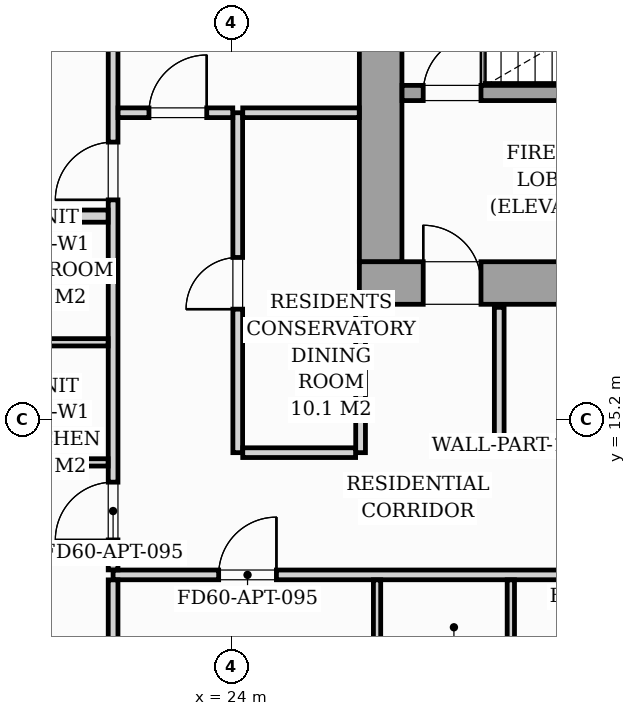
"""IFC4 building model, lengths in metres.
Left out: names, types, materials, properties, quantities, classifications, styles, units other than length and angle.
Written with IfcOpenShell. Run it as: python <this file> out.ifc"""

import sys

from ifc_helpers import new_model, si_unit, direction, frame, frame_2d, origin, origin_2d, place, context, subcontext, project, spatial, rectangle, i_section, extrude, source, transform, mapped, element, fill, save


model = new_model("IFC4")
c1 = context("Model", 3, precision=1e-05, world=origin(), true_north=direction((0.0, 1.0)))
c2 = subcontext(c1, "Body", "Model", "MODEL_VIEW")
j1 = project(units=[si_unit("LENGTHUNIT", "METRE"), si_unit("PLANEANGLEUNIT", "RADIAN")], contexts=[c1])
p1 = place(None, origin())
s1 = spatial("IfcSite", under=j1, at=p1, CompositionType="ELEMENT")
p2 = place(p1, origin())
s2 = spatial("IfcBuilding", under=s1, at=p2, CompositionType="ELEMENT")
p3 = place(p2, frame((0.0, 0.0, 159.8)))
s3 = spatial("IfcBuildingStorey", under=s2, at=p3, CompositionType="ELEMENT", Elevation=159.8)
m1 = source(origin(), c2, "Body", "SweptSolid", [
    extrude(i_section(OverallWidth=0.421, OverallDepth=0.465, WebThickness=0.045, FlangeThickness=0.073, FilletRadius=0.018, at=origin_2d()), origin(), (0.0, 0.0, 1.0), 3.196),
])
p4 = place(p3, frame((26.4, 17.4, 0.002), z_axis=(0.0, 0.0, 1.0), x_axis=(1.0, 0.0, 0.0)))
e1 = element("IfcColumn", 1, at=p4, inside=s3, PredefinedType="PILASTER", context=c2, shape_type="MappedRepresentation", body=[
    mapped(m1, transform((0.0, 0.0, 0.0), scale=1.0)),
])
p5 = place(p3, frame((26.1, 17.45, 0.0), z_axis=(0.0, 0.0, 1.0), x_axis=(1.0, 0.0, 0.0)))
e2 = element("IfcWall", 2, at=p5, inside=s3, PredefinedType="SHEAR", context=c2, shape_type="SweptSolid", body=[
    extrude(rectangle(XDim=19.8, YDim=0.7, at=frame_2d((9.9, 0.0))), origin(), (0.0, 0.0, 1.0), 3.2),
])
p6 = place(p5, frame((1.05, 0.0, 0.0)))
e3 = element("IfcOpeningElement", 3, at=p6, cuts=e2, PredefinedType="OPENING", context=c2, shape_type="SweptSolid", body=[
    extrude(rectangle(XDim=0.95, YDim=2.06, at=frame_2d((0.475, 1.03))), frame((0.0, 0.36, 0.0), z_axis=(0.0, -1.0, 0.0), x_axis=(1.0, 0.0, 0.0)), (0.0, 0.0, 1.0), 0.72),
])
p7 = place(p5, frame((9.48, 0.0, 0.0)))
e4 = element("IfcOpeningElement", 4, at=p7, cuts=e2, PredefinedType="OPENING", context=c2, shape_type="SweptSolid", body=[
    extrude(rectangle(XDim=0.85, YDim=2.0, at=frame_2d((0.425, 1.0))), frame((0.0, 0.36, 0.0), z_axis=(0.0, -1.0, 0.0), x_axis=(1.0, 0.0, 0.0)), (0.0, 0.0, 1.0), 0.72),
])
p8 = place(p5, frame((17.65, 0.0, 0.0)))
e5 = element("IfcOpeningElement", 5, at=p8, cuts=e2, PredefinedType="OPENING", context=c2, shape_type="SweptSolid", body=[
    extrude(rectangle(XDim=0.95, YDim=2.06, at=frame_2d((0.475, 1.03))), frame((0.0, 0.36, 0.0), z_axis=(0.0, -1.0, 0.0), x_axis=(1.0, 0.0, 0.0)), (0.0, 0.0, 1.0), 0.72),
])
p9 = place(p3, frame((26.45, 17.802, 0.0), z_axis=(0.0, 0.0, 1.0), x_axis=(0.0, 1.0, 0.0)))
e6 = element("IfcWall", 6, at=p9, inside=s3, PredefinedType="SHEAR", context=c2, shape_type="SweptSolid", body=[
    extrude(rectangle(XDim=5.796, YDim=0.7, at=frame_2d((2.898, 0.0))), origin(), (0.0, 0.0, 1.0), 3.2),
])
p10 = place(p3, frame((26.802, 20.575, 0.0), z_axis=(0.0, 0.0, 1.0), x_axis=(1.0, 0.0, 0.0)))
e7 = element("IfcWall", 7, at=p10, inside=s3, PredefinedType="SOLIDWALL", context=c2, shape_type="SweptSolid", body=[
    extrude(rectangle(XDim=8.148, YDim=0.25, at=frame_2d((4.074, 0.0))), origin(), (0.0, 0.0, 1.0), 3.2),
])
p11 = place(p10, frame((0.348, 0.0, 0.0)))
e8 = element("IfcOpeningElement", 8, at=p11, cuts=e7, PredefinedType="OPENING", context=c2, shape_type="SweptSolid", body=[
    extrude(rectangle(XDim=0.95, YDim=2.06, at=frame_2d((0.475, 1.03))), frame((0.0, 0.135, 0.0), z_axis=(0.0, -1.0, 0.0), x_axis=(1.0, 0.0, 0.0)), (0.0, 0.0, 1.0), 0.27),
])
p12 = place(p3, frame((28.4, 14.75, 0.0), z_axis=(0.0, 0.0, 1.0), x_axis=(0.0, 1.0, 0.0)))
e9 = element("IfcWall", 9, at=p12, inside=s3, PredefinedType="PARTITIONING", context=c2, shape_type="SweptSolid", body=[
    extrude(rectangle(XDim=2.3, YDim=0.16, at=frame_2d((1.15, 0.0))), origin(), (0.0, 0.0, 1.0), 2.9),
])
p13 = place(p3, frame((28.482, 14.75, 0.0), z_axis=(0.0, 0.0, 1.0), x_axis=(1.0, 0.0, 0.0)))
e10 = element("IfcWall", 10, at=p13, inside=s3, PredefinedType="PARTITIONING", context=c2, shape_type="SweptSolid", body=[
    extrude(rectangle(XDim=4.516, YDim=0.16, at=frame_2d((2.258, 0.0))), origin(), (0.0, 0.0, 1.0), 2.9),
])
p14 = place(p13, frame((1.868, 0.0, 0.0)))
e11 = element("IfcOpeningElement", 11, at=p14, cuts=e10, PredefinedType="OPENING", context=c2, shape_type="SweptSolid", body=[
    extrude(rectangle(XDim=0.8, YDim=2.05, at=frame_2d((0.4, 1.025))), frame((0.0, 0.09, 0.0), z_axis=(0.0, -1.0, 0.0), x_axis=(1.0, 0.0, 0.0)), (0.0, 0.0, 1.0), 0.18),
])
p15 = place(p3, frame((22.05, 12.65, 0.0), z_axis=(0.0, 0.0, 1.0), x_axis=(1.0, 0.0, 0.0)))
e12 = element("IfcWall", 12, at=p15, inside=s3, PredefinedType="PARTITIONING", context=c2, shape_type="SweptSolid", body=[
    extrude(rectangle(XDim=25.65, YDim=0.16, at=frame_2d((12.825, 0.0))), origin(), (0.0, 0.0, 1.0), 2.9),
])
p16 = place(p15, frame((1.736, 0.0, 0.0)))
e13 = element("IfcOpeningElement", 13, at=p16, cuts=e12, PredefinedType="OPENING", context=c2, shape_type="SweptSolid", body=[
    extrude(rectangle(XDim=0.95, YDim=2.06, at=frame_2d((0.475, 1.03))), frame((0.0, 0.09, 0.0), z_axis=(0.0, -1.0, 0.0), x_axis=(1.0, 0.0, 0.0)), (0.0, 0.0, 1.0), 0.18),
])
p17 = place(p15, frame((10.3, 0.0, 0.0)))
e14 = element("IfcOpeningElement", 14, at=p17, cuts=e12, PredefinedType="OPENING", context=c2, shape_type="SweptSolid", body=[
    extrude(rectangle(XDim=0.95, YDim=2.06, at=frame_2d((0.475, 1.03))), frame((0.0, 0.09, 0.0), z_axis=(0.0, -1.0, 0.0), x_axis=(1.0, 0.0, 0.0)), (0.0, 0.0, 1.0), 0.18),
])
p18 = place(p15, frame((22.965, 0.0, 0.0)))
e15 = element("IfcOpeningElement", 15, at=p18, cuts=e12, PredefinedType="OPENING", context=c2, shape_type="SweptSolid", body=[
    extrude(rectangle(XDim=0.95, YDim=2.06, at=frame_2d((0.475, 1.03))), frame((0.0, 0.09, 0.0), z_axis=(0.0, -1.0, 0.0), x_axis=(1.0, 0.0, 0.0)), (0.0, 0.0, 1.0), 0.18),
])
p19 = place(p3, frame((22.05, 8.253, 0.0), z_axis=(0.0, 0.0, 1.0), x_axis=(0.0, 1.0, 0.0)))
e16 = element("IfcWall", 16, at=p19, inside=s3, PredefinedType="PARTITIONING", context=c2, shape_type="SweptSolid", body=[
    extrude(rectangle(XDim=4.315, YDim=0.16, at=frame_2d((2.157, 0.0))), origin(), (0.0, 0.0, 1.0), 2.9),
])
p20 = place(p3, frame((22.05, 12.732, 0.0), z_axis=(0.0, 0.0, 1.0), x_axis=(0.0, 1.0, 0.0)))
e17 = element("IfcWall", 17, at=p20, inside=s3, PredefinedType="PARTITIONING", context=c2, shape_type="SweptSolid", body=[
    extrude(rectangle(XDim=14.685, YDim=0.16, at=frame_2d((7.343, 0.0))), origin(), (0.0, 0.0, 1.0), 2.9),
])
p21 = place(p20, frame((0.493, 0.0, 0.0)))
e18 = element("IfcOpeningElement", 18, at=p21, cuts=e17, PredefinedType="OPENING", context=c2, shape_type="SweptSolid", body=[
    extrude(rectangle(XDim=0.95, YDim=2.06, at=frame_2d((0.475, 1.03))), frame((0.0, 0.09, 0.0), z_axis=(0.0, -1.0, 0.0), x_axis=(1.0, 0.0, 0.0)), (0.0, 0.0, 1.0), 0.18),
])
p22 = place(p20, frame((6.085, 0.0, 0.0)))
e19 = element("IfcOpeningElement", 19, at=p22, cuts=e17, PredefinedType="OPENING", context=c2, shape_type="SweptSolid", body=[
    extrude(rectangle(XDim=0.95, YDim=2.06, at=frame_2d((0.475, 1.03))), frame((0.0, 0.09, 0.0), z_axis=(0.0, -1.0, 0.0), x_axis=(1.0, 0.0, 0.0)), (0.0, 0.0, 1.0), 0.18),
])
for number, where, z_axis, x_axis in (
    (20, (26.391, 10.462, 0.0), (0.0, 0.0, 1.0), (0.0, 1.0, 0.0)),
    (21, (28.591, 10.462, 0.0), (0.0, 0.0, 1.0), (0.0, 1.0, 0.0)),
):
    element("IfcWall", number, at=place(p3, frame(where, z_axis=z_axis, x_axis=x_axis)), inside=s3, PredefinedType="PARTITIONING", context=c2, shape_type="SweptSolid", body=[
        extrude(rectangle(XDim=2.106, YDim=0.12, at=frame_2d((1.053, 0.0))), origin(), (0.0, 0.0, 1.0), 2.9),
    ])
p23 = place(p3, frame((6.125, 18.55, 0.0), z_axis=(0.0, 0.0, 1.0), x_axis=(1.0, 0.0, 0.0)))
e22 = element("IfcWall", 22, at=p23, inside=s3, PredefinedType="PARTITIONING", context=c2, shape_type="SweptSolid", body=[
    extrude(rectangle(XDim=15.843, YDim=0.2, at=frame_2d((7.921, 0.0))), origin(), (0.0, 0.0, 1.0), 2.023),
])
for number, where, z_axis, x_axis in (
    (23, (19.712, 16.475, 0.0), (0.0, 0.0, 1.0), (1.0, 0.0, 0.0)),
    (24, (19.712, 14.5, 0.0), (0.0, 0.0, 1.0), (1.0, 0.0, 0.0)),
):
    element("IfcWall", number, at=place(p3, frame(where, z_axis=z_axis, x_axis=x_axis)), inside=s3, PredefinedType="PARTITIONING", context=c2, shape_type="SweptSolid", body=[
        extrude(rectangle(XDim=2.256, YDim=0.12, at=frame_2d((1.128, 0.0))), origin(), (0.0, 0.0, 1.0), 2.9),
    ])
p24 = place(p3, frame((24.1, 14.66, 0.0), z_axis=(0.0, 0.0, 1.0), x_axis=(0.0, 1.0, 0.0)))
e25 = element("IfcWall", 25, at=p24, inside=s3, PredefinedType="PARTITIONING", context=c2, shape_type="SweptSolid", body=[
    extrude(rectangle(XDim=5.59, YDim=0.16, at=frame_2d((2.795, 0.0))), origin(), (0.0, 0.0, 1.0), 2.9),
])
p25 = place(p24, frame((2.36, 0.0, 0.0)))
e26 = element("IfcOpeningElement", 26, at=p25, cuts=e25, PredefinedType="OPENING", context=c2, shape_type="SweptSolid", body=[
    extrude(rectangle(XDim=0.85, YDim=2.0, at=frame_2d((0.425, 1.0))), frame((0.0, 0.09, 0.0), z_axis=(0.0, -1.0, 0.0), x_axis=(1.0, 0.0, 0.0)), (0.0, 0.0, 1.0), 0.18),
])
p26 = place(p3, frame((22.132, 20.25, 0.0), z_axis=(0.0, 0.0, 1.0), x_axis=(1.0, 0.0, 0.0)))
e27 = element("IfcWall", 27, at=p26, inside=s3, PredefinedType="PARTITIONING", context=c2, shape_type="SweptSolid", body=[
    extrude(rectangle(XDim=1.886, YDim=0.16, at=frame_2d((0.943, 0.0))), origin(), (0.0, 0.0, 1.0), 2.9),
])
p27 = place(p26, frame((0.508, 0.0, 0.0)))
e28 = element("IfcOpeningElement", 28, at=p27, cuts=e27, PredefinedType="OPENING", context=c2, shape_type="SweptSolid", body=[
    extrude(rectangle(XDim=0.95, YDim=2.06, at=frame_2d((0.475, 1.03))), frame((0.0, 0.09, 0.0), z_axis=(0.0, -1.0, 0.0), x_axis=(1.0, 0.0, 0.0)), (0.0, 0.0, 1.0), 0.18),
])
p28 = place(p3, frame((24.182, 20.25, 0.0), z_axis=(0.0, 0.0, 1.0), x_axis=(1.0, 0.0, 0.0)))
e29 = element("IfcWall", 29, at=p28, inside=s3, PredefinedType="PARTITIONING", context=c2, shape_type="SweptSolid", body=[
    extrude(rectangle(XDim=1.916, YDim=0.16, at=frame_2d((0.958, 0.0))), origin(), (0.0, 0.0, 1.0), 2.9),
])
p29 = place(p3, frame((26.12, 14.66, 0.0), z_axis=(0.0, 0.0, 1.0), x_axis=(0.0, 1.0, 0.0)))
e30 = element("IfcWall", 30, at=p29, inside=s3, PredefinedType="PARTITIONING", context=c2, shape_type="SweptSolid", body=[
    extrude(rectangle(XDim=2.438, YDim=0.16, at=frame_2d((1.219, 0.0))), origin(), (0.0, 0.0, 1.0), 2.9),
])
p30 = place(p3, frame((24.182, 14.66, 0.0), z_axis=(0.0, 0.0, 1.0), x_axis=(1.0, 0.0, 0.0)))
e31 = element("IfcWall", 31, at=p30, inside=s3, PredefinedType="PARTITIONING", context=c2, shape_type="SweptSolid", body=[
    extrude(rectangle(XDim=1.856, YDim=0.16, at=frame_2d((0.928, 0.0))), origin(), (0.0, 0.0, 1.0), 2.9),
])
m2 = source(origin(), c2, "Body", "SweptSolid", [
    extrude(rectangle(XDim=0.95, YDim=2.06, at=frame_2d((0.475, 1.03))), frame((0.0, 0.025, 0.0), z_axis=(0.0, -1.0, 0.0), x_axis=(1.0, 0.0, 0.0)), (0.0, 0.0, 1.0), 0.05),
])
p31 = place(p6, origin())
e32 = element("IfcDoor", 32, at=p31, inside=s3, OperationType="SINGLE_SWING_LEFT", PredefinedType="DOOR", context=c2, shape_type="MappedRepresentation", body=[
    mapped(m2, transform((0.0, 0.0, 0.0), scale=1.0)),
])
fill(e3, e32)
p32 = place(p11, origin())
e33 = element("IfcDoor", 33, at=p32, inside=s3, OperationType="SINGLE_SWING_RIGHT", PredefinedType="DOOR", context=c2, shape_type="MappedRepresentation", body=[
    mapped(m2, transform((0.0, 0.0, 0.0), scale=1.0)),
])
fill(e8, e33)
m3 = source(origin(), c2, "Body", "SweptSolid", [
    extrude(rectangle(XDim=0.95, YDim=2.06, at=frame_2d((0.475, 1.03))), frame((0.0, 0.025, 0.0), z_axis=(0.0, -1.0, 0.0), x_axis=(1.0, 0.0, 0.0)), (0.0, 0.0, 1.0), 0.05),
])
p33 = place(p16, origin())
e34 = element("IfcDoor", 34, at=p33, inside=s3, OperationType="SINGLE_SWING_RIGHT", PredefinedType="DOOR", context=c2, shape_type="MappedRepresentation", body=[
    mapped(m3, transform((0.0, 0.0, 0.0), scale=1.0)),
])
fill(e13, e34)
p34 = place(p21, origin())
e35 = element("IfcDoor", 35, at=p34, inside=s3, OperationType="SINGLE_SWING_LEFT", PredefinedType="DOOR", context=c2, shape_type="MappedRepresentation", body=[
    mapped(m3, transform((0.0, 0.0, 0.0), scale=1.0)),
])
fill(e18, e35)
p35 = place(p22, origin())
e36 = element("IfcDoor", 36, at=p35, inside=s3, OperationType="SINGLE_SWING_LEFT", PredefinedType="DOOR", context=c2, shape_type="MappedRepresentation", body=[
    mapped(m3, transform((0.0, 0.0, 0.0), scale=1.0)),
])
fill(e19, e36)
m4 = source(origin(), c2, "Body", "SweptSolid", [
    extrude(rectangle(XDim=0.85, YDim=2.0, at=frame_2d((0.425, 1.0))), frame((0.0, 0.025, 0.0), z_axis=(0.0, -1.0, 0.0), x_axis=(1.0, 0.0, 0.0)), (0.0, 0.0, 1.0), 0.05),
])
p36 = place(p25, origin())
e37 = element("IfcDoor", 37, at=p36, inside=s3, OperationType="SINGLE_SWING_LEFT", PredefinedType="DOOR", context=c2, shape_type="MappedRepresentation", body=[
    mapped(m4, transform((0.0, 0.0, 0.0), scale=1.0)),
])
fill(e26, e37)
p37 = place(p27, origin())
e38 = element("IfcDoor", 38, at=p37, inside=s3, OperationType="SINGLE_SWING_RIGHT", PredefinedType="DOOR", context=c2, shape_type="MappedRepresentation", body=[
    mapped(m3, transform((0.0, 0.0, 0.0), scale=1.0)),
])
fill(e28, e38)
save(model, sys.argv[1])
